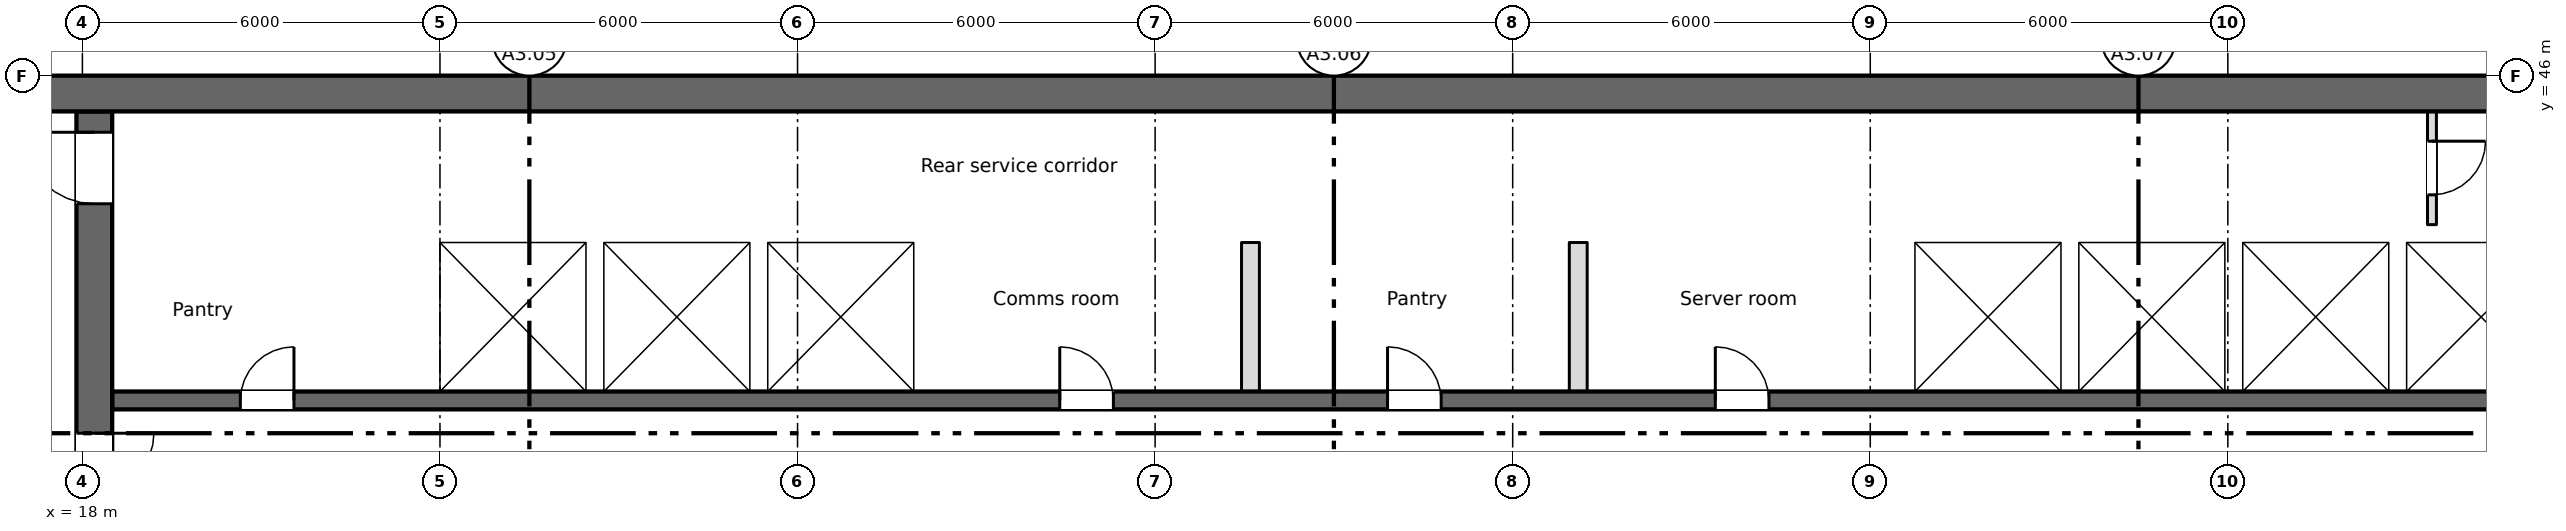
"""IFC4 building model, lengths in metres.
Left out: names, types, materials, properties, quantities, classifications, styles, units other than length and angle.
Written with IfcOpenShell. Run it as: python <this file> out.ifc"""

import sys

from ifc_helpers import new_model, si_unit, direction, frame, frame_2d, origin, place, context, subcontext, project, spatial, rectangle, extrude, element, fill, save


model = new_model("IFC4")
c1 = context("Model", 3, precision=1e-05, world=origin(), true_north=direction((0.0, 1.0)))
c2 = subcontext(c1, "Body", "Model", "MODEL_VIEW")
j1 = project(units=[si_unit("LENGTHUNIT", "METRE"), si_unit("PLANEANGLEUNIT", "RADIAN")], contexts=[c1])
p1 = place(None, origin())
s1 = spatial("IfcSite", under=j1, at=p1, CompositionType="ELEMENT")
p2 = place(p1, origin())
s2 = spatial("IfcBuilding", under=s1, at=p2, CompositionType="ELEMENT")
p3 = place(p2, frame((0.0, 0.0, 243.15)))
s3 = spatial("IfcBuildingStorey", under=s2, at=p3, CompositionType="ELEMENT", Elevation=243.15)
p4 = place(p3, frame((11.55, 45.7, 0.0), z_axis=(0.0, 0.0, 1.0), x_axis=(1.0, 0.0, 0.0)))
e1 = element("IfcWall", 1, at=p4, inside=s3, PredefinedType="SHEAR", context=c2, shape_type="SweptSolid", body=[
    extrude(rectangle(XDim=48.9, YDim=0.6, at=frame_2d((24.45, 0.0))), origin(), (0.0, 0.0, 1.0), 3.4),
])
p5 = place(p4, frame((1.2, 0.0, 0.6)))
e2 = element("IfcOpeningElement", 2, at=p5, cuts=e1, PredefinedType="OPENING", context=c2, shape_type="SweptSolid", body=[
    extrude(rectangle(XDim=0.6, YDim=2.4, at=frame_2d((0.3, 1.2))), frame((0.0, 0.31, 0.0), z_axis=(0.0, -1.0, 0.0), x_axis=(1.0, 0.0, 0.0)), (0.0, 0.0, 1.0), 0.62),
])
p6 = place(p3, frame((18.2, 28.4, 0.0), z_axis=(0.0, 0.0, 1.0), x_axis=(0.0, 1.0, 0.0)))
e3 = element("IfcWall", 3, at=p6, inside=s3, PredefinedType="SHEAR", context=c2, shape_type="SweptSolid", body=[
    extrude(rectangle(XDim=17.0, YDim=0.6, at=frame_2d((8.5, 0.0))), origin(), (0.0, 0.0, 1.0), 3.4),
])
p7 = place(p6, frame((9.6, 0.0, 0.0)))
e4 = element("IfcOpeningElement", 4, at=p7, cuts=e3, PredefinedType="OPENING", context=c2, shape_type="SweptSolid", body=[
    extrude(rectangle(XDim=2.0, YDim=2.1, at=frame_2d((1.0, 1.05))), frame((0.0, 0.31, 0.0), z_axis=(0.0, -1.0, 0.0), x_axis=(1.0, 0.0, 0.0)), (0.0, 0.0, 1.0), 0.62),
])
p8 = place(p6, frame((15.45, 0.0, 0.0)))
e5 = element("IfcOpeningElement", 5, at=p8, cuts=e3, PredefinedType="OPENING", context=c2, shape_type="SweptSolid", body=[
    extrude(rectangle(XDim=1.2, YDim=2.1, at=frame_2d((0.6, 1.05))), frame((0.0, 0.31, 0.0), z_axis=(0.0, -1.0, 0.0), x_axis=(1.0, 0.0, 0.0)), (0.0, 0.0, 1.0), 0.62),
])
p9 = place(p3, frame((18.5, 40.55, 0.0), z_axis=(0.0, 0.0, 1.0), x_axis=(1.0, 0.0, 0.0)))
e6 = element("IfcWall", 6, at=p9, inside=s3, PredefinedType="SHEAR", context=c2, shape_type="SweptSolid", body=[
    extrude(rectangle(XDim=41.0, YDim=0.3, at=frame_2d((20.5, 0.0))), origin(), (0.0, 0.0, 1.0), 3.4),
])
p10 = place(p9, frame((2.15, 0.0, 0.0)))
e7 = element("IfcOpeningElement", 7, at=p10, cuts=e6, PredefinedType="OPENING", context=c2, shape_type="SweptSolid", body=[
    extrude(rectangle(XDim=0.9, YDim=2.1, at=frame_2d((0.45, 1.05))), frame((0.0, 0.16, 0.0), z_axis=(0.0, -1.0, 0.0), x_axis=(1.0, 0.0, 0.0)), (0.0, 0.0, 1.0), 0.32),
])
p11 = place(p9, frame((15.9, 0.0, 0.0)))
e8 = element("IfcOpeningElement", 8, at=p11, cuts=e6, PredefinedType="OPENING", context=c2, shape_type="SweptSolid", body=[
    extrude(rectangle(XDim=0.9, YDim=2.1, at=frame_2d((0.45, 1.05))), frame((0.0, 0.16, 0.0), z_axis=(0.0, -1.0, 0.0), x_axis=(1.0, 0.0, 0.0)), (0.0, 0.0, 1.0), 0.32),
])
p12 = place(p9, frame((21.4, 0.0, 0.0)))
e9 = element("IfcOpeningElement", 9, at=p12, cuts=e6, PredefinedType="OPENING", context=c2, shape_type="SweptSolid", body=[
    extrude(rectangle(XDim=0.9, YDim=2.1, at=frame_2d((0.45, 1.05))), frame((0.0, 0.16, 0.0), z_axis=(0.0, -1.0, 0.0), x_axis=(1.0, 0.0, 0.0)), (0.0, 0.0, 1.0), 0.32),
])
p13 = place(p9, frame((26.9, 0.0, 0.0)))
e10 = element("IfcOpeningElement", 10, at=p13, cuts=e6, PredefinedType="OPENING", context=c2, shape_type="SweptSolid", body=[
    extrude(rectangle(XDim=0.9, YDim=2.1, at=frame_2d((0.45, 1.05))), frame((0.0, 0.16, 0.0), z_axis=(0.0, -1.0, 0.0), x_axis=(1.0, 0.0, 0.0)), (0.0, 0.0, 1.0), 0.32),
])
p14 = place(p9, frame((6.175, 0.0, 0.0)))
e11 = element("IfcOpeningElement", 11, at=p14, cuts=e6, PredefinedType="OPENING", context=c2, shape_type="SweptSolid", body=[
    extrude(rectangle(XDim=1.1, YDim=2.1, at=frame_2d((0.55, 1.05))), frame((0.0, 0.16, 0.0), z_axis=(0.0, -1.0, 0.0), x_axis=(1.0, 0.0, 0.0)), (0.0, 0.0, 1.0), 0.32),
])
p15 = place(p9, frame((8.925, 0.0, 0.0)))
e12 = element("IfcOpeningElement", 12, at=p15, cuts=e6, PredefinedType="OPENING", context=c2, shape_type="SweptSolid", body=[
    extrude(rectangle(XDim=1.1, YDim=2.1, at=frame_2d((0.55, 1.05))), frame((0.0, 0.16, 0.0), z_axis=(0.0, -1.0, 0.0), x_axis=(1.0, 0.0, 0.0)), (0.0, 0.0, 1.0), 0.32),
])
p16 = place(p9, frame((11.675, 0.0, 0.0)))
e13 = element("IfcOpeningElement", 13, at=p16, cuts=e6, PredefinedType="OPENING", context=c2, shape_type="SweptSolid", body=[
    extrude(rectangle(XDim=1.1, YDim=2.1, at=frame_2d((0.55, 1.05))), frame((0.0, 0.16, 0.0), z_axis=(0.0, -1.0, 0.0), x_axis=(1.0, 0.0, 0.0)), (0.0, 0.0, 1.0), 0.32),
])
p17 = place(p9, frame((30.925, 0.0, 0.0)))
e14 = element("IfcOpeningElement", 14, at=p17, cuts=e6, PredefinedType="OPENING", context=c2, shape_type="SweptSolid", body=[
    extrude(rectangle(XDim=1.1, YDim=2.1, at=frame_2d((0.55, 1.05))), frame((0.0, 0.16, 0.0), z_axis=(0.0, -1.0, 0.0), x_axis=(1.0, 0.0, 0.0)), (0.0, 0.0, 1.0), 0.32),
])
p18 = place(p9, frame((33.675, 0.0, 0.0)))
e15 = element("IfcOpeningElement", 15, at=p18, cuts=e6, PredefinedType="OPENING", context=c2, shape_type="SweptSolid", body=[
    extrude(rectangle(XDim=1.1, YDim=2.1, at=frame_2d((0.55, 1.05))), frame((0.0, 0.16, 0.0), z_axis=(0.0, -1.0, 0.0), x_axis=(1.0, 0.0, 0.0)), (0.0, 0.0, 1.0), 0.32),
])
p19 = place(p9, frame((36.375, 0.0, 0.0)))
e16 = element("IfcOpeningElement", 16, at=p19, cuts=e6, PredefinedType="OPENING", context=c2, shape_type="SweptSolid", body=[
    extrude(rectangle(XDim=1.2, YDim=2.1, at=frame_2d((0.6, 1.05))), frame((0.0, 0.16, 0.0), z_axis=(0.0, -1.0, 0.0), x_axis=(1.0, 0.0, 0.0)), (0.0, 0.0, 1.0), 0.32),
])
p20 = place(p9, frame((39.15, 0.0, 0.0)))
e17 = element("IfcOpeningElement", 17, at=p20, cuts=e6, PredefinedType="OPENING", context=c2, shape_type="SweptSolid", body=[
    extrude(rectangle(XDim=1.2, YDim=2.1, at=frame_2d((0.6, 1.05))), frame((0.0, 0.16, 0.0), z_axis=(0.0, -1.0, 0.0), x_axis=(1.0, 0.0, 0.0)), (0.0, 0.0, 1.0), 0.32),
])
p21 = place(p3, frame((18.5, 43.35, 0.0), z_axis=(0.0, 0.0, 1.0), x_axis=(1.0, 0.0, 0.0)))
e18 = element("IfcWall", 18, at=p21, inside=s3, PredefinedType="SHEAR", context=c2, shape_type="SweptSolid", body=[
    extrude(rectangle(XDim=41.0, YDim=0.3, at=frame_2d((20.5, 0.0))), origin(), (0.0, 0.0, 1.0), 3.4),
])
for number, where, z_axis, x_axis in (
    (19, (23.85, 40.7, 0.0), (0.0, 0.0, 1.0), (0.0, 1.0, 0.0)),
    (20, (26.6, 40.7, 0.0), (0.0, 0.0, 1.0), (0.0, 1.0, 0.0)),
    (21, (29.35, 40.7, 0.0), (0.0, 0.0, 1.0), (0.0, 1.0, 0.0)),
    (22, (32.1, 40.7, 0.0), (0.0, 0.0, 1.0), (0.0, 1.0, 0.0)),
    (23, (48.6, 40.7, 0.0), (0.0, 0.0, 1.0), (0.0, 1.0, 0.0)),
    (24, (51.35, 40.7, 0.0), (0.0, 0.0, 1.0), (0.0, 1.0, 0.0)),
    (25, (54.1, 40.7, 0.0), (0.0, 0.0, 1.0), (0.0, 1.0, 0.0)),
    (26, (56.85, 40.7, 0.0), (0.0, 0.0, 1.0), (0.0, 1.0, 0.0)),
):
    element("IfcWall", number, at=place(p3, frame(where, z_axis=z_axis, x_axis=x_axis)), inside=s3, PredefinedType="SHEAR", context=c2, shape_type="SweptSolid", body=[
        extrude(rectangle(XDim=2.5, YDim=0.3, at=frame_2d((1.25, 0.0))), origin(), (0.0, 0.0, 1.0), 3.4),
    ])
p22 = place(p3, frame((57.425, 45.4, 0.0), z_axis=(0.0, 0.0, 1.0), x_axis=(0.0, -1.0, 0.0)))
e27 = element("IfcWall", 27, at=p22, inside=s3, PredefinedType="PARTITIONING", context=c2, shape_type="SweptSolid", body=[
    extrude(rectangle(XDim=1.9, YDim=0.15, at=frame_2d((0.95, 0.0))), origin(), (0.0, 0.0, 1.0), 3.4),
])
p23 = place(p22, frame((0.5, 0.0, 0.0)))
e28 = element("IfcOpeningElement", 28, at=p23, cuts=e27, PredefinedType="OPENING", context=c2, shape_type="SweptSolid", body=[
    extrude(rectangle(XDim=0.9, YDim=2.1, at=frame_2d((0.45, 1.05))), frame((0.0, 0.085, 0.0), z_axis=(0.0, -1.0, 0.0), x_axis=(1.0, 0.0, 0.0)), (0.0, 0.0, 1.0), 0.17),
])
for number, where, z_axis, x_axis in (
    (29, (37.6, 40.7, 0.0), (0.0, 0.0, 1.0), (0.0, 1.0, 0.0)),
    (30, (43.1, 40.7, 0.0), (0.0, 0.0, 1.0), (0.0, 1.0, 0.0)),
):
    element("IfcWall", number, at=place(p3, frame(where, z_axis=z_axis, x_axis=x_axis)), inside=s3, PredefinedType="PARTITIONING", context=c2, shape_type="SweptSolid", body=[
        extrude(rectangle(XDim=2.5, YDim=0.3, at=frame_2d((1.25, 0.0))), origin(), (0.0, 0.0, 1.0), 3.4),
    ])
p24 = place(p23, origin())
e31 = element("IfcDoor", 31, at=p24, inside=s3, OperationType="SINGLE_SWING_LEFT", PredefinedType="DOOR", context=c2, shape_type="SweptSolid", body=[
    extrude(rectangle(XDim=0.9, YDim=2.1, at=frame_2d((0.45, 1.05))), frame((0.0, 0.025, 0.0), z_axis=(0.0, -1.0, 0.0), x_axis=(1.0, 0.0, 0.0)), (0.0, 0.0, 1.0), 0.05),
])
fill(e28, e31)
p25 = place(p10, origin())
e32 = element("IfcDoor", 32, at=p25, inside=s3, OperationType="SINGLE_SWING_RIGHT", PredefinedType="DOOR", context=c2, shape_type="SweptSolid", body=[
    extrude(rectangle(XDim=0.9, YDim=2.1, at=frame_2d((0.45, 1.05))), frame((0.0, 0.025, 0.0), z_axis=(0.0, -1.0, 0.0), x_axis=(1.0, 0.0, 0.0)), (0.0, 0.0, 1.0), 0.05),
])
fill(e7, e32)
p26 = place(p11, origin())
e33 = element("IfcDoor", 33, at=p26, inside=s3, OperationType="SINGLE_SWING_LEFT", PredefinedType="DOOR", context=c2, shape_type="SweptSolid", body=[
    extrude(rectangle(XDim=0.9, YDim=2.1, at=frame_2d((0.45, 1.05))), frame((0.0, 0.025, 0.0), z_axis=(0.0, -1.0, 0.0), x_axis=(1.0, 0.0, 0.0)), (0.0, 0.0, 1.0), 0.05),
])
fill(e8, e33)
p27 = place(p12, origin())
e34 = element("IfcDoor", 34, at=p27, inside=s3, OperationType="SINGLE_SWING_LEFT", PredefinedType="DOOR", context=c2, shape_type="SweptSolid", body=[
    extrude(rectangle(XDim=0.9, YDim=2.1, at=frame_2d((0.45, 1.05))), frame((0.0, 0.025, 0.0), z_axis=(0.0, -1.0, 0.0), x_axis=(1.0, 0.0, 0.0)), (0.0, 0.0, 1.0), 0.05),
])
fill(e9, e34)
p28 = place(p13, origin())
e35 = element("IfcDoor", 35, at=p28, inside=s3, OperationType="SINGLE_SWING_LEFT", PredefinedType="DOOR", context=c2, shape_type="SweptSolid", body=[
    extrude(rectangle(XDim=0.9, YDim=2.1, at=frame_2d((0.45, 1.05))), frame((0.0, 0.025, 0.0), z_axis=(0.0, -1.0, 0.0), x_axis=(1.0, 0.0, 0.0)), (0.0, 0.0, 1.0), 0.05),
])
fill(e10, e35)
p29 = place(p14, origin())
e36 = element("IfcDoor", 36, at=p29, inside=s3, OperationType="SLIDING_TO_LEFT", PredefinedType="DOOR", context=c2, shape_type="SweptSolid", body=[
    extrude(rectangle(XDim=1.1, YDim=2.1, at=frame_2d((0.55, 1.05))), frame((0.0, 0.025, 0.0), z_axis=(0.0, -1.0, 0.0), x_axis=(1.0, 0.0, 0.0)), (0.0, 0.0, 1.0), 0.05),
])
fill(e11, e36)
p30 = place(p15, origin())
e37 = element("IfcDoor", 37, at=p30, inside=s3, OperationType="SLIDING_TO_LEFT", PredefinedType="DOOR", context=c2, shape_type="SweptSolid", body=[
    extrude(rectangle(XDim=1.1, YDim=2.1, at=frame_2d((0.55, 1.05))), frame((0.0, 0.025, 0.0), z_axis=(0.0, -1.0, 0.0), x_axis=(1.0, 0.0, 0.0)), (0.0, 0.0, 1.0), 0.05),
])
fill(e12, e37)
p31 = place(p16, origin())
e38 = element("IfcDoor", 38, at=p31, inside=s3, OperationType="SLIDING_TO_LEFT", PredefinedType="DOOR", context=c2, shape_type="SweptSolid", body=[
    extrude(rectangle(XDim=1.1, YDim=2.1, at=frame_2d((0.55, 1.05))), frame((0.0, 0.025, 0.0), z_axis=(0.0, -1.0, 0.0), x_axis=(1.0, 0.0, 0.0)), (0.0, 0.0, 1.0), 0.05),
])
fill(e13, e38)
p32 = place(p17, origin())
e39 = element("IfcDoor", 39, at=p32, inside=s3, OperationType="SLIDING_TO_LEFT", PredefinedType="DOOR", context=c2, shape_type="SweptSolid", body=[
    extrude(rectangle(XDim=1.1, YDim=2.1, at=frame_2d((0.55, 1.05))), frame((0.0, 0.025, 0.0), z_axis=(0.0, -1.0, 0.0), x_axis=(1.0, 0.0, 0.0)), (0.0, 0.0, 1.0), 0.05),
])
fill(e14, e39)
p33 = place(p18, origin())
e40 = element("IfcDoor", 40, at=p33, inside=s3, OperationType="SLIDING_TO_LEFT", PredefinedType="DOOR", context=c2, shape_type="SweptSolid", body=[
    extrude(rectangle(XDim=1.1, YDim=2.1, at=frame_2d((0.55, 1.05))), frame((0.0, 0.025, 0.0), z_axis=(0.0, -1.0, 0.0), x_axis=(1.0, 0.0, 0.0)), (0.0, 0.0, 1.0), 0.05),
])
fill(e15, e40)
p34 = place(p19, origin())
e41 = element("IfcDoor", 41, at=p34, inside=s3, OperationType="SLIDING_TO_LEFT", PredefinedType="DOOR", context=c2, shape_type="SweptSolid", body=[
    extrude(rectangle(XDim=1.2, YDim=2.1, at=frame_2d((0.6, 1.05))), frame((0.0, 0.025, 0.0), z_axis=(0.0, -1.0, 0.0), x_axis=(1.0, 0.0, 0.0)), (0.0, 0.0, 1.0), 0.05),
])
fill(e16, e41)
p35 = place(p20, origin())
e42 = element("IfcDoor", 42, at=p35, inside=s3, OperationType="SLIDING_TO_LEFT", PredefinedType="DOOR", context=c2, shape_type="SweptSolid", body=[
    extrude(rectangle(XDim=1.2, YDim=2.1, at=frame_2d((0.6, 1.05))), frame((0.0, 0.025, 0.0), z_axis=(0.0, -1.0, 0.0), x_axis=(1.0, 0.0, 0.0)), (0.0, 0.0, 1.0), 0.05),
])
fill(e17, e42)
p36 = place(p7, origin())
e43 = element("IfcDoor", 43, at=p36, inside=s3, OperationType="DOUBLE_DOOR_SINGLE_SWING", PredefinedType="DOOR", context=c2, shape_type="SweptSolid", body=[
    extrude(rectangle(XDim=2.0, YDim=2.1, at=frame_2d((1.0, 1.05))), frame((0.0, 0.025, 0.0), z_axis=(0.0, -1.0, 0.0), x_axis=(1.0, 0.0, 0.0)), (0.0, 0.0, 1.0), 0.05),
])
fill(e4, e43)
p37 = place(p8, origin())
e44 = element("IfcDoor", 44, at=p37, inside=s3, OperationType="SINGLE_SWING_RIGHT", PredefinedType="DOOR", context=c2, shape_type="SweptSolid", body=[
    extrude(rectangle(XDim=1.2, YDim=2.1, at=frame_2d((0.6, 1.05))), frame((0.0, 0.025, 0.0), z_axis=(0.0, -1.0, 0.0), x_axis=(1.0, 0.0, 0.0)), (0.0, 0.0, 1.0), 0.05),
])
fill(e5, e44)
save(model, sys.argv[1])
